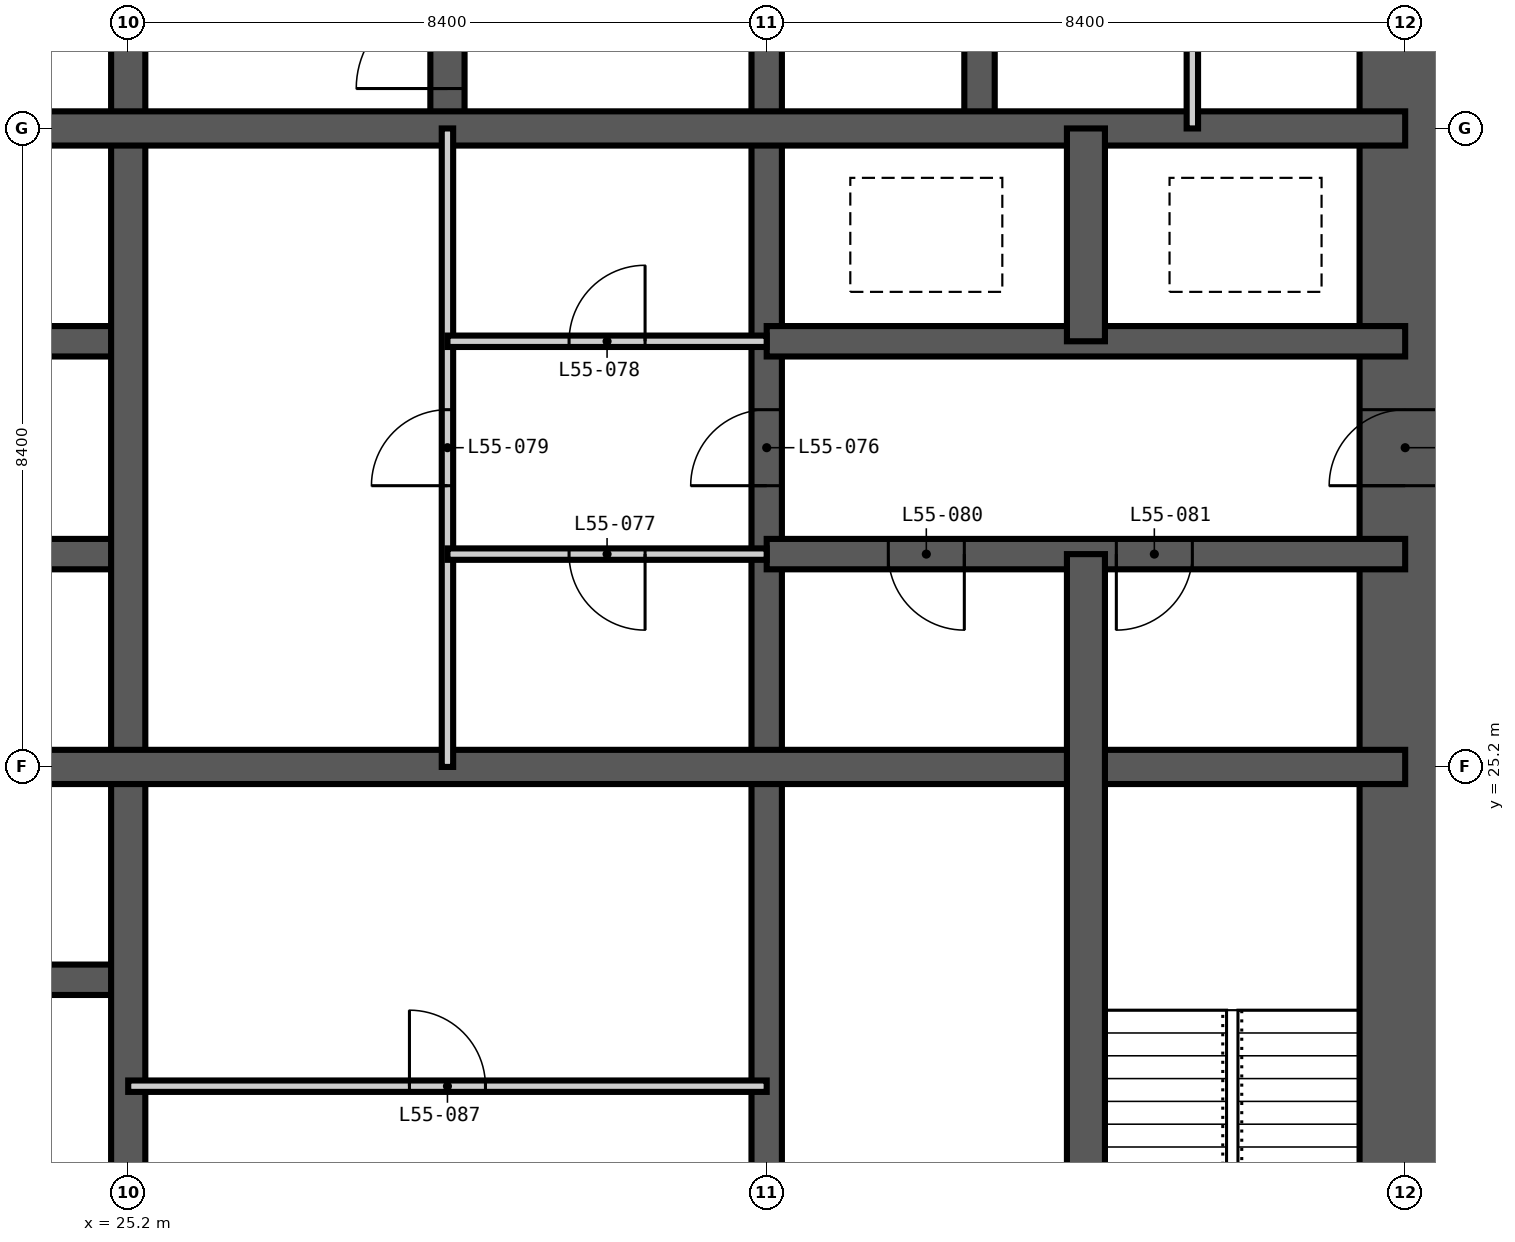
"""IFC4 building model, lengths in metres.
Left out: names, types, materials, properties, quantities, classifications, styles, units other than length and angle.
Written with IfcOpenShell. Run it as: python <this file> out.ifc"""

import sys

from ifc_helpers import new_model, si_unit, direction, frame, frame_2d, origin, place, context, subcontext, project, spatial, rectangle, extrude, element, fill, save


model = new_model("IFC4")
c1 = context("Model", 3, precision=1e-05, world=origin(), true_north=direction((0.0, 1.0)))
c2 = subcontext(c1, "Body", "Model", "MODEL_VIEW")
j1 = project(units=[si_unit("LENGTHUNIT", "METRE"), si_unit("PLANEANGLEUNIT", "RADIAN")], contexts=[c1])
p1 = place(None, origin())
s1 = spatial("IfcSite", under=j1, at=p1, CompositionType="ELEMENT")
p2 = place(p1, origin())
s2 = spatial("IfcBuilding", under=s1, at=p2, CompositionType="ELEMENT")
p3 = place(p2, frame((0.0, 0.0, 213.0)))
s3 = spatial("IfcBuildingStorey", under=s2, at=p3, CompositionType="ELEMENT", Elevation=213.0)
p4 = place(p3, frame((42.0, 17.4, -0.35), z_axis=(0.0, 0.0, 1.0), x_axis=(0.0, 1.0, 0.0)))
e1 = element("IfcWall", 1, at=p4, inside=s3, PredefinedType="SHEAR", context=c2, shape_type="SweptSolid", body=[
    extrude(rectangle(XDim=24.0, YDim=1.2, at=frame_2d((12.0, 0.0))), origin(), (0.0, 0.0, 1.0), 3.6),
])
p5 = place(p4, frame((0.2, 0.0, 0.35)))
e2 = element("IfcOpeningElement", 2, at=p5, cuts=e1, PredefinedType="OPENING", context=c2, shape_type="SweptSolid", body=[
    extrude(rectangle(XDim=1.2, YDim=2.2, at=frame_2d((0.6, 1.1))), frame((0.0, 0.61, 0.0), z_axis=(0.0, -1.0, 0.0), x_axis=(1.0, 0.0, 0.0)), (0.0, 0.0, 1.0), 1.22),
])
p6 = place(p4, frame((11.5, 0.0, 0.35)))
e3 = element("IfcOpeningElement", 3, at=p6, cuts=e1, PredefinedType="OPENING", context=c2, shape_type="SweptSolid", body=[
    extrude(rectangle(XDim=1.0, YDim=2.1, at=frame_2d((0.5, 1.05))), frame((0.0, 0.61, 0.0), z_axis=(0.0, -1.0, 0.0), x_axis=(1.0, 0.0, 0.0)), (0.0, 0.0, 1.0), 1.22),
])
p7 = place(p4, frame((19.9, 0.0, 0.35)))
e4 = element("IfcOpeningElement", 4, at=p7, cuts=e1, PredefinedType="OPENING", context=c2, shape_type="SweptSolid", body=[
    extrude(rectangle(XDim=1.0, YDim=2.1, at=frame_2d((0.5, 1.05))), frame((0.0, 0.61, 0.0), z_axis=(0.0, -1.0, 0.0), x_axis=(1.0, 0.0, 0.0)), (0.0, 0.0, 1.0), 1.22),
])
p8 = place(p3, frame((33.6, 16.8, -0.35), z_axis=(0.0, 0.0, 1.0), x_axis=(0.0, 1.0, 0.0)))
e5 = element("IfcWall", 5, at=p8, inside=s3, PredefinedType="SHEAR", context=c2, shape_type="SweptSolid", body=[
    extrude(rectangle(XDim=25.2, YDim=0.4, at=frame_2d((12.6, 0.0))), origin(), (0.0, 0.0, 1.0), 3.6),
])
p9 = place(p8, frame((22.5, 0.0, 0.35)))
e6 = element("IfcOpeningElement", 6, at=p9, cuts=e5, PredefinedType="OPENING", context=c2, shape_type="SweptSolid", body=[
    extrude(rectangle(XDim=1.2, YDim=2.2, at=frame_2d((0.6, 1.1))), frame((0.0, 0.21, 0.0), z_axis=(0.0, -1.0, 0.0), x_axis=(1.0, 0.0, 0.0)), (0.0, 0.0, 1.0), 0.42),
])
p10 = place(p8, frame((18.3, 0.0, 0.35)))
e7 = element("IfcOpeningElement", 7, at=p10, cuts=e5, PredefinedType="OPENING", context=c2, shape_type="SweptSolid", body=[
    extrude(rectangle(XDim=1.2, YDim=2.2, at=frame_2d((0.6, 1.1))), frame((0.0, 0.21, 0.0), z_axis=(0.0, -1.0, 0.0), x_axis=(1.0, 0.0, 0.0)), (0.0, 0.0, 1.0), 0.42),
])
p11 = place(p8, frame((12.1, 0.0, 0.35)))
e8 = element("IfcOpeningElement", 8, at=p11, cuts=e5, PredefinedType="OPENING", context=c2, shape_type="SweptSolid", body=[
    extrude(rectangle(XDim=1.0, YDim=2.1, at=frame_2d((0.5, 1.05))), frame((0.0, 0.21, 0.0), z_axis=(0.0, -1.0, 0.0), x_axis=(1.0, 0.0, 0.0)), (0.0, 0.0, 1.0), 0.42),
])
p12 = place(p3, frame((36.4, 33.6, -0.35), z_axis=(0.0, 0.0, 1.0), x_axis=(0.0, 1.0, 0.0)))
e9 = element("IfcWall", 9, at=p12, inside=s3, PredefinedType="SHEAR", context=c2, shape_type="SweptSolid", body=[
    extrude(rectangle(XDim=8.4, YDim=0.4, at=frame_2d((4.2, 0.0))), origin(), (0.0, 0.0, 1.0), 3.6),
])
p13 = place(p3, frame((16.8, 22.4, -0.35), z_axis=(0.0, 0.0, 1.0), x_axis=(1.0, 0.0, 0.0)))
e10 = element("IfcWall", 10, at=p13, inside=s3, PredefinedType="SHEAR", context=c2, shape_type="SweptSolid", body=[
    extrude(rectangle(XDim=8.4, YDim=0.4, at=frame_2d((4.2, 0.0))), origin(), (0.0, 0.0, 1.0), 3.6),
])
p14 = place(p13, frame((1.6, 0.0, 0.35)))
e11 = element("IfcOpeningElement", 11, at=p14, cuts=e10, PredefinedType="OPENING", context=c2, shape_type="SweptSolid", body=[
    extrude(rectangle(XDim=1.0, YDim=2.1, at=frame_2d((0.5, 1.05))), frame((0.0, 0.21, 0.0), z_axis=(0.0, -1.0, 0.0), x_axis=(1.0, 0.0, 0.0)), (0.0, 0.0, 1.0), 0.42),
])
p15 = place(p13, frame((5.8, 0.0, 0.35)))
e12 = element("IfcOpeningElement", 12, at=p15, cuts=e10, PredefinedType="OPENING", context=c2, shape_type="SweptSolid", body=[
    extrude(rectangle(XDim=1.0, YDim=2.1, at=frame_2d((0.5, 1.05))), frame((0.0, 0.21, 0.0), z_axis=(0.0, -1.0, 0.0), x_axis=(1.0, 0.0, 0.0)), (0.0, 0.0, 1.0), 0.42),
])
p16 = place(p3, frame((16.8, 28.0, -0.35), z_axis=(0.0, 0.0, 1.0), x_axis=(1.0, 0.0, 0.0)))
e13 = element("IfcWall", 13, at=p16, inside=s3, PredefinedType="SHEAR", context=c2, shape_type="SweptSolid", body=[
    extrude(rectangle(XDim=8.4, YDim=0.4, at=frame_2d((4.2, 0.0))), origin(), (0.0, 0.0, 1.0), 3.6),
])
p17 = place(p16, frame((1.55, 0.0, 0.35)))
e14 = element("IfcOpeningElement", 14, at=p17, cuts=e13, PredefinedType="OPENING", context=c2, shape_type="SweptSolid", body=[
    extrude(rectangle(XDim=1.1, YDim=2.2, at=frame_2d((0.55, 1.1))), frame((0.0, 0.21, 0.0), z_axis=(0.0, -1.0, 0.0), x_axis=(1.0, 0.0, 0.0)), (0.0, 0.0, 1.0), 0.42),
])
p18 = place(p16, frame((5.75, 0.0, 0.35)))
e15 = element("IfcOpeningElement", 15, at=p18, cuts=e13, PredefinedType="OPENING", context=c2, shape_type="SweptSolid", body=[
    extrude(rectangle(XDim=1.1, YDim=2.2, at=frame_2d((0.55, 1.1))), frame((0.0, 0.21, 0.0), z_axis=(0.0, -1.0, 0.0), x_axis=(1.0, 0.0, 0.0)), (0.0, 0.0, 1.0), 0.42),
])
p19 = place(p3, frame((33.6, 28.0, -0.35), z_axis=(0.0, 0.0, 1.0), x_axis=(1.0, 0.0, 0.0)))
e16 = element("IfcWall", 16, at=p19, inside=s3, PredefinedType="SHEAR", context=c2, shape_type="SweptSolid", body=[
    extrude(rectangle(XDim=8.4, YDim=0.4, at=frame_2d((4.2, 0.0))), origin(), (0.0, 0.0, 1.0), 3.6),
])
p20 = place(p19, frame((1.6, 0.0, 0.35)))
e17 = element("IfcOpeningElement", 17, at=p20, cuts=e16, PredefinedType="OPENING", context=c2, shape_type="SweptSolid", body=[
    extrude(rectangle(XDim=1.0, YDim=2.1, at=frame_2d((0.5, 1.05))), frame((0.0, 0.21, 0.0), z_axis=(0.0, -1.0, 0.0), x_axis=(1.0, 0.0, 0.0)), (0.0, 0.0, 1.0), 0.42),
])
p21 = place(p19, frame((4.6, 0.0, 0.35)))
e18 = element("IfcOpeningElement", 18, at=p21, cuts=e16, PredefinedType="OPENING", context=c2, shape_type="SweptSolid", body=[
    extrude(rectangle(XDim=1.0, YDim=2.1, at=frame_2d((0.5, 1.05))), frame((0.0, 0.21, 0.0), z_axis=(0.0, -1.0, 0.0), x_axis=(1.0, 0.0, 0.0)), (0.0, 0.0, 1.0), 0.42),
])
p22 = place(p3, frame((16.8, 30.8, -0.35), z_axis=(0.0, 0.0, 1.0), x_axis=(1.0, 0.0, 0.0)))
e19 = element("IfcWall", 19, at=p22, inside=s3, PredefinedType="SHEAR", context=c2, shape_type="SweptSolid", body=[
    extrude(rectangle(XDim=8.4, YDim=0.4, at=frame_2d((4.2, 0.0))), origin(), (0.0, 0.0, 1.0), 3.6),
])
p23 = place(p22, frame((1.55, 0.0, 0.35)))
e20 = element("IfcOpeningElement", 20, at=p23, cuts=e19, PredefinedType="OPENING", context=c2, shape_type="SweptSolid", body=[
    extrude(rectangle(XDim=1.1, YDim=2.2, at=frame_2d((0.55, 1.1))), frame((0.0, 0.21, 0.0), z_axis=(0.0, -1.0, 0.0), x_axis=(1.0, 0.0, 0.0)), (0.0, 0.0, 1.0), 0.42),
])
p24 = place(p22, frame((5.75, 0.0, 0.35)))
e21 = element("IfcOpeningElement", 21, at=p24, cuts=e19, PredefinedType="OPENING", context=c2, shape_type="SweptSolid", body=[
    extrude(rectangle(XDim=1.1, YDim=2.2, at=frame_2d((0.55, 1.1))), frame((0.0, 0.21, 0.0), z_axis=(0.0, -1.0, 0.0), x_axis=(1.0, 0.0, 0.0)), (0.0, 0.0, 1.0), 0.42),
])
p25 = place(p3, frame((33.6, 30.8, -0.35), z_axis=(0.0, 0.0, 1.0), x_axis=(1.0, 0.0, 0.0)))
e22 = element("IfcWall", 22, at=p25, inside=s3, PredefinedType="SHEAR", context=c2, shape_type="SweptSolid", body=[
    extrude(rectangle(XDim=8.4, YDim=0.4, at=frame_2d((4.2, 0.0))), origin(), (0.0, 0.0, 1.0), 3.6),
])
p26 = place(p3, frame((25.2, 16.8, -0.35), z_axis=(0.0, 0.0, 1.0), x_axis=(0.0, 1.0, 0.0)))
e23 = element("IfcWall", 23, at=p26, inside=s3, PredefinedType="SHEAR", context=c2, shape_type="SweptSolid", body=[
    extrude(rectangle(XDim=25.2, YDim=0.45, at=frame_2d((12.6, 0.0))), origin(), (0.0, 0.0, 1.0), 3.6),
])
p27 = place(p3, frame((29.4, 33.6, -0.35), z_axis=(0.0, 0.0, 1.0), x_axis=(0.0, 1.0, 0.0)))
e24 = element("IfcWall", 24, at=p27, inside=s3, PredefinedType="SHEAR", context=c2, shape_type="SweptSolid", body=[
    extrude(rectangle(XDim=8.4, YDim=0.45, at=frame_2d((4.2, 0.0))), origin(), (0.0, 0.0, 1.0), 3.6),
])
p28 = place(p27, frame((0.525, 0.0, 0.35)))
e25 = element("IfcOpeningElement", 25, at=p28, cuts=e24, PredefinedType="OPENING", context=c2, shape_type="SweptSolid", body=[
    extrude(rectangle(XDim=1.2, YDim=2.2, at=frame_2d((0.6, 1.1))), frame((0.0, 0.235, 0.0), z_axis=(0.0, -1.0, 0.0), x_axis=(1.0, 0.0, 0.0)), (0.0, 0.0, 1.0), 0.47),
])
for number, where, z_axis, x_axis in (
    (26, (16.8, 25.2, -0.35), (0.0, 0.0, 1.0), (1.0, 0.0, 0.0)),
    (27, (16.8, 33.6, -0.35), (0.0, 0.0, 1.0), (1.0, 0.0, 0.0)),
):
    element("IfcWall", number, at=place(p3, frame(where, z_axis=z_axis, x_axis=x_axis)), inside=s3, PredefinedType="SHEAR", context=c2, shape_type="SweptSolid", body=[
        extrude(rectangle(XDim=25.2, YDim=0.45, at=frame_2d((12.6, 0.0))), origin(), (0.0, 0.0, 1.0), 3.6),
    ])
p29 = place(p3, frame((37.8, 16.8, -0.35), z_axis=(0.0, 0.0, 1.0), x_axis=(0.0, 1.0, 0.0)))
e28 = element("IfcWall", 28, at=p29, inside=s3, PredefinedType="SHEAR", context=c2, shape_type="SweptSolid", body=[
    extrude(rectangle(XDim=11.2, YDim=0.5, at=frame_2d((5.6, 0.0))), origin(), (0.0, 0.0, 1.0), 3.6),
])
p30 = place(p3, frame((37.8, 30.8, -0.35), z_axis=(0.0, 0.0, 1.0), x_axis=(0.0, 1.0, 0.0)))
e29 = element("IfcWall", 29, at=p30, inside=s3, PredefinedType="SHEAR", context=c2, shape_type="SweptSolid", body=[
    extrude(rectangle(XDim=2.8, YDim=0.5, at=frame_2d((1.4, 0.0))), origin(), (0.0, 0.0, 1.0), 3.6),
])
p31 = place(p3, frame((29.4, 25.2, 0.0), z_axis=(0.0, 0.0, 1.0), x_axis=(0.0, 1.0, 0.0)))
e30 = element("IfcWall", 30, at=p31, inside=s3, PredefinedType="PARTITIONING", context=c2, shape_type="SweptSolid", body=[
    extrude(rectangle(XDim=8.4, YDim=0.15, at=frame_2d((4.2, 0.0))), origin(), (0.0, 0.0, 1.0), 3.25),
])
p32 = place(p31, frame((3.7, 0.0, 0.0)))
e31 = element("IfcOpeningElement", 31, at=p32, cuts=e30, PredefinedType="OPENING", context=c2, shape_type="SweptSolid", body=[
    extrude(rectangle(XDim=1.0, YDim=2.1, at=frame_2d((0.5, 1.05))), frame((0.0, 0.085, 0.0), z_axis=(0.0, -1.0, 0.0), x_axis=(1.0, 0.0, 0.0)), (0.0, 0.0, 1.0), 0.17),
])
p33 = place(p3, frame((39.2, 33.6, 0.0), z_axis=(0.0, 0.0, 1.0), x_axis=(0.0, 1.0, 0.0)))
e32 = element("IfcWall", 32, at=p33, inside=s3, PredefinedType="PARTITIONING", context=c2, shape_type="SweptSolid", body=[
    extrude(rectangle(XDim=8.4, YDim=0.15, at=frame_2d((4.2, 0.0))), origin(), (0.0, 0.0, 1.0), 3.25),
])
p34 = place(p33, frame((3.7, 0.0, 0.0)))
e33 = element("IfcOpeningElement", 33, at=p34, cuts=e32, PredefinedType="OPENING", context=c2, shape_type="SweptSolid", body=[
    extrude(rectangle(XDim=1.0, YDim=2.1, at=frame_2d((0.5, 1.05))), frame((0.0, 0.085, 0.0), z_axis=(0.0, -1.0, 0.0), x_axis=(1.0, 0.0, 0.0)), (0.0, 0.0, 1.0), 0.17),
])
p35 = place(p3, frame((25.2, 21.0, 0.0), z_axis=(0.0, 0.0, 1.0), x_axis=(1.0, 0.0, 0.0)))
e34 = element("IfcWall", 34, at=p35, inside=s3, PredefinedType="PARTITIONING", context=c2, shape_type="SweptSolid", body=[
    extrude(rectangle(XDim=8.4, YDim=0.15, at=frame_2d((4.2, 0.0))), origin(), (0.0, 0.0, 1.0), 3.25),
])
p36 = place(p35, frame((3.7, 0.0, 0.0)))
e35 = element("IfcOpeningElement", 35, at=p36, cuts=e34, PredefinedType="OPENING", context=c2, shape_type="SweptSolid", body=[
    extrude(rectangle(XDim=1.0, YDim=2.1, at=frame_2d((0.5, 1.05))), frame((0.0, 0.085, 0.0), z_axis=(0.0, -1.0, 0.0), x_axis=(1.0, 0.0, 0.0)), (0.0, 0.0, 1.0), 0.17),
])
p37 = place(p3, frame((29.4, 28.0, 0.0), z_axis=(0.0, 0.0, 1.0), x_axis=(1.0, 0.0, 0.0)))
e36 = element("IfcWall", 36, at=p37, inside=s3, PredefinedType="PARTITIONING", context=c2, shape_type="SweptSolid", body=[
    extrude(rectangle(XDim=4.2, YDim=0.15, at=frame_2d((2.1, 0.0))), origin(), (0.0, 0.0, 1.0), 3.25),
])
p38 = place(p37, frame((1.6, 0.0, 0.0)))
e37 = element("IfcOpeningElement", 37, at=p38, cuts=e36, PredefinedType="OPENING", context=c2, shape_type="SweptSolid", body=[
    extrude(rectangle(XDim=1.0, YDim=2.1, at=frame_2d((0.5, 1.05))), frame((0.0, 0.085, 0.0), z_axis=(0.0, -1.0, 0.0), x_axis=(1.0, 0.0, 0.0)), (0.0, 0.0, 1.0), 0.17),
])
p39 = place(p3, frame((29.4, 30.8, 0.0), z_axis=(0.0, 0.0, 1.0), x_axis=(1.0, 0.0, 0.0)))
e38 = element("IfcWall", 38, at=p39, inside=s3, PredefinedType="PARTITIONING", context=c2, shape_type="SweptSolid", body=[
    extrude(rectangle(XDim=4.2, YDim=0.15, at=frame_2d((2.1, 0.0))), origin(), (0.0, 0.0, 1.0), 3.25),
])
p40 = place(p39, frame((1.6, 0.0, 0.0)))
e39 = element("IfcOpeningElement", 39, at=p40, cuts=e38, PredefinedType="OPENING", context=c2, shape_type="SweptSolid", body=[
    extrude(rectangle(XDim=1.0, YDim=2.1, at=frame_2d((0.5, 1.05))), frame((0.0, 0.085, 0.0), z_axis=(0.0, -1.0, 0.0), x_axis=(1.0, 0.0, 0.0)), (0.0, 0.0, 1.0), 0.17),
])
p41 = place(p28, origin())
e40 = element("IfcDoor", 40, at=p41, inside=s3, OperationType="SINGLE_SWING_LEFT", PredefinedType="DOOR", context=c2, shape_type="SweptSolid", body=[
    extrude(rectangle(XDim=1.2, YDim=2.2, at=frame_2d((0.6, 1.1))), frame((0.0, 0.025, 0.0), z_axis=(0.0, -1.0, 0.0), x_axis=(1.0, 0.0, 0.0)), (0.0, 0.0, 1.0), 0.05),
])
fill(e25, e40)
p42 = place(p11, origin())
e41 = element("IfcDoor", 41, at=p42, inside=s3, OperationType="SINGLE_SWING_LEFT", PredefinedType="DOOR", context=c2, shape_type="SweptSolid", body=[
    extrude(rectangle(XDim=1.0, YDim=2.1, at=frame_2d((0.5, 1.05))), frame((0.0, 0.025, 0.0), z_axis=(0.0, -1.0, 0.0), x_axis=(1.0, 0.0, 0.0)), (0.0, 0.0, 1.0), 0.05),
])
fill(e8, e41)
p43 = place(p38, frame((1.0, 0.0, 0.0), z_axis=(0.0, 0.0, 1.0), x_axis=(-1.0, 0.0, 0.0)))
e42 = element("IfcDoor", 42, at=p43, inside=s3, OperationType="SINGLE_SWING_LEFT", PredefinedType="DOOR", context=c2, shape_type="SweptSolid", body=[
    extrude(rectangle(XDim=1.0, YDim=2.1, at=frame_2d((0.5, 1.05))), frame((0.0, 0.025, 0.0), z_axis=(0.0, -1.0, 0.0), x_axis=(1.0, 0.0, 0.0)), (0.0, 0.0, 1.0), 0.05),
])
fill(e37, e42)
p44 = place(p40, origin())
e43 = element("IfcDoor", 43, at=p44, inside=s3, OperationType="SINGLE_SWING_RIGHT", PredefinedType="DOOR", context=c2, shape_type="SweptSolid", body=[
    extrude(rectangle(XDim=1.0, YDim=2.1, at=frame_2d((0.5, 1.05))), frame((0.0, 0.025, 0.0), z_axis=(0.0, -1.0, 0.0), x_axis=(1.0, 0.0, 0.0)), (0.0, 0.0, 1.0), 0.05),
])
fill(e39, e43)
p45 = place(p32, origin())
e44 = element("IfcDoor", 44, at=p45, inside=s3, OperationType="SINGLE_SWING_LEFT", PredefinedType="DOOR", context=c2, shape_type="SweptSolid", body=[
    extrude(rectangle(XDim=1.0, YDim=2.1, at=frame_2d((0.5, 1.05))), frame((0.0, 0.025, 0.0), z_axis=(0.0, -1.0, 0.0), x_axis=(1.0, 0.0, 0.0)), (0.0, 0.0, 1.0), 0.05),
])
fill(e31, e44)
p46 = place(p20, frame((1.0, 0.0, 0.0), z_axis=(0.0, 0.0, 1.0), x_axis=(-1.0, 0.0, 0.0)))
e45 = element("IfcDoor", 45, at=p46, inside=s3, OperationType="SINGLE_SWING_LEFT", PredefinedType="DOOR", context=c2, shape_type="SweptSolid", body=[
    extrude(rectangle(XDim=1.0, YDim=2.1, at=frame_2d((0.5, 1.05))), frame((0.0, 0.025, 0.0), z_axis=(0.0, -1.0, 0.0), x_axis=(1.0, 0.0, 0.0)), (0.0, 0.0, 1.0), 0.05),
])
fill(e17, e45)
p47 = place(p21, frame((1.0, 0.0, 0.0), z_axis=(0.0, 0.0, 1.0), x_axis=(-1.0, 0.0, 0.0)))
e46 = element("IfcDoor", 46, at=p47, inside=s3, OperationType="SINGLE_SWING_RIGHT", PredefinedType="DOOR", context=c2, shape_type="SweptSolid", body=[
    extrude(rectangle(XDim=1.0, YDim=2.1, at=frame_2d((0.5, 1.05))), frame((0.0, 0.025, 0.0), z_axis=(0.0, -1.0, 0.0), x_axis=(1.0, 0.0, 0.0)), (0.0, 0.0, 1.0), 0.05),
])
fill(e18, e46)
p48 = place(p6, origin())
e47 = element("IfcDoor", 47, at=p48, inside=s3, OperationType="SINGLE_SWING_LEFT", PredefinedType="DOOR", context=c2, shape_type="SweptSolid", body=[
    extrude(rectangle(XDim=1.0, YDim=2.1, at=frame_2d((0.5, 1.05))), frame((0.0, 0.025, 0.0), z_axis=(0.0, -1.0, 0.0), x_axis=(1.0, 0.0, 0.0)), (0.0, 0.0, 1.0), 0.05),
])
fill(e3, e47)
p49 = place(p36, origin())
e48 = element("IfcDoor", 48, at=p49, inside=s3, OperationType="SINGLE_SWING_LEFT", PredefinedType="DOOR", context=c2, shape_type="SweptSolid", body=[
    extrude(rectangle(XDim=1.0, YDim=2.1, at=frame_2d((0.5, 1.05))), frame((0.0, 0.025, 0.0), z_axis=(0.0, -1.0, 0.0), x_axis=(1.0, 0.0, 0.0)), (0.0, 0.0, 1.0), 0.05),
])
fill(e35, e48)
save(model, sys.argv[1])
